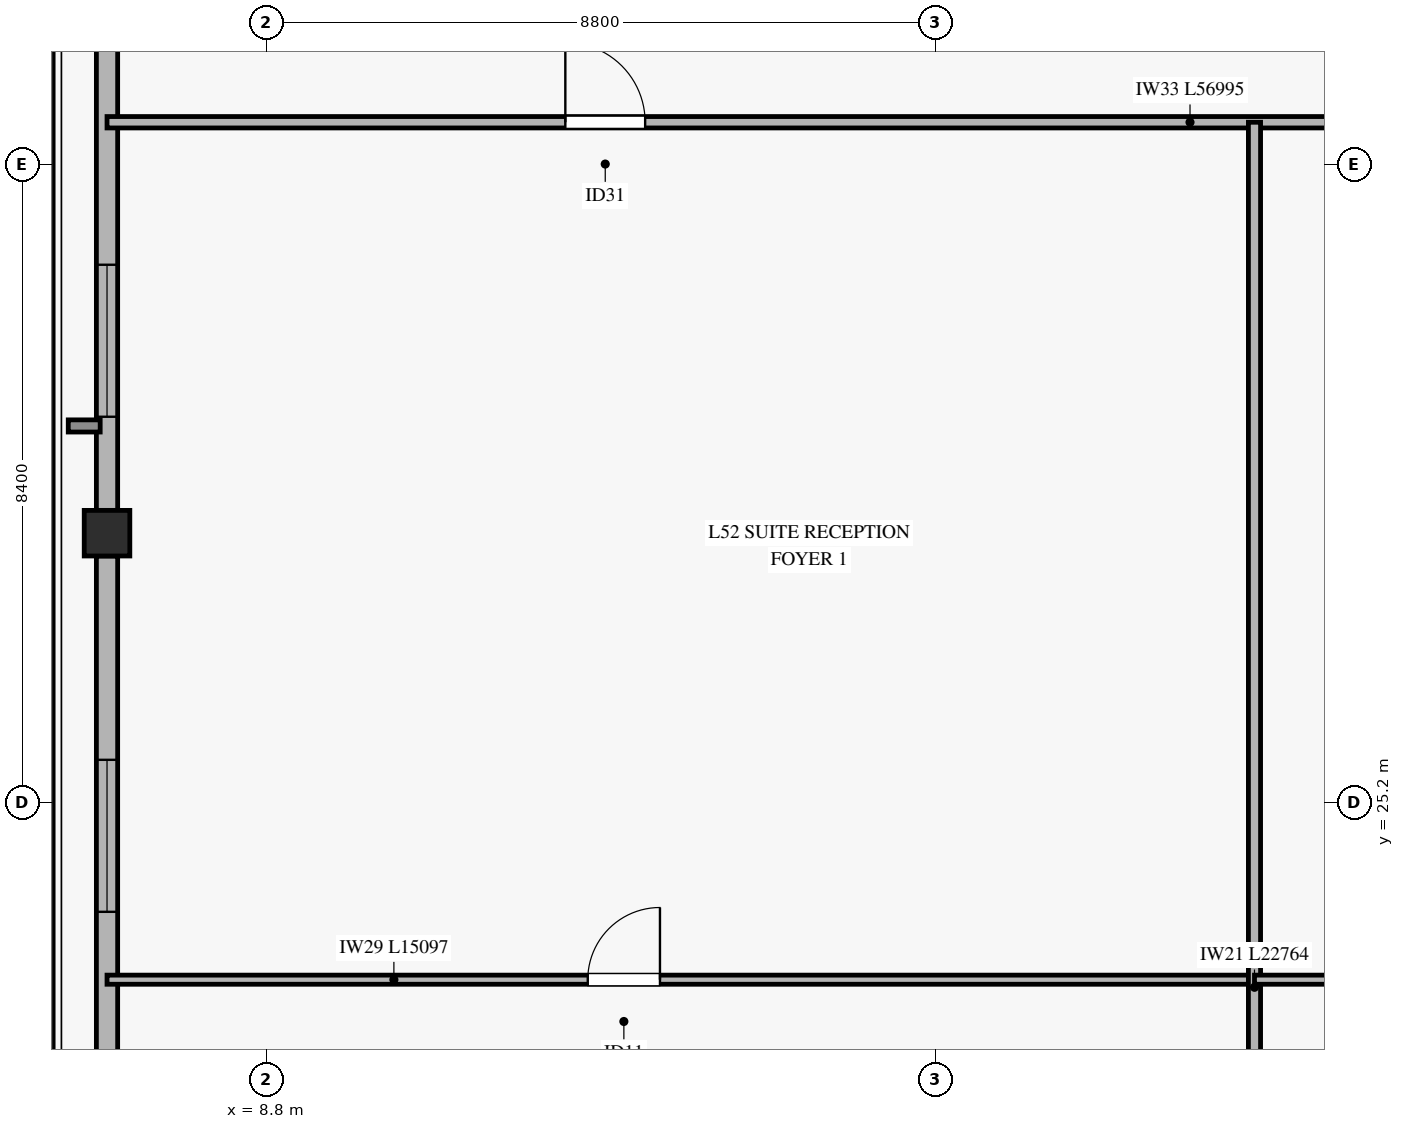
"""IFC4 building model, lengths in metres.
Left out: names, types, materials, properties, quantities, classifications, styles, units other than length and angle.
Written with IfcOpenShell. Run it as: python <this file> out.ifc"""

import sys

from ifc_helpers import new_model, si_unit, direction, frame, frame_2d, origin, origin_2d, place, context, subcontext, project, spatial, rectangle, hollow_rectangle, extrude, source, transform, mapped, element, fill, save


model = new_model("IFC4")
c1 = context("Model", 3, precision=1e-05, world=origin(), true_north=direction((0.0, 1.0)))
c2 = subcontext(c1, "Body", "Model", "MODEL_VIEW")
j1 = project(units=[si_unit("LENGTHUNIT", "METRE"), si_unit("PLANEANGLEUNIT", "RADIAN")], contexts=[c1])
p1 = place(None, origin())
s1 = spatial("IfcSite", under=j1, at=p1, CompositionType="ELEMENT")
p2 = place(p1, origin())
s2 = spatial("IfcBuilding", under=s1, at=p2, CompositionType="ELEMENT")
p3 = place(p2, frame((0.0, 0.0, 206.2)))
s3 = spatial("IfcBuildingStorey", under=s2, at=p3, CompositionType="ELEMENT", Elevation=206.2)
m1 = source(origin(), c2, "Body", "SweptSolid", [
    extrude(hollow_rectangle(XDim=0.6, YDim=0.6, WallThickness=0.028, at=origin_2d()), origin(), (0.0, 0.0, 1.0), 3.27),
])
p4 = place(p3, frame((6.703, 28.743, 0.0), z_axis=(0.0, 0.0, 1.0), x_axis=(1.0, 0.0, 0.0)))
e1 = element("IfcColumn", 1, at=p4, inside=s3, PredefinedType="COLUMN", context=c2, shape_type="MappedRepresentation", body=[
    mapped(m1, transform((0.0, 0.0, 0.0), x_axis=(1.0, 0.0, 0.0), y_axis=(0.0, 1.0, 0.0), z_axis=(0.0, 0.0, 1.0), scale=1.0)),
])
p5 = place(p3, frame((6.703, 14.186, 0.0), z_axis=(0.0, 0.0, 1.0), x_axis=(0.0, 1.0, 0.0)))
e2 = element("IfcWall", 2, at=p5, inside=s3, PredefinedType="SOLIDWALL", context=c2, shape_type="SweptSolid", body=[
    extrude(rectangle(XDim=14.257, YDim=0.28, at=frame_2d((7.128, 0.0))), origin(), (0.0, 0.0, 1.0), 2.75),
])
p6 = place(p5, frame((2.947, 0.0, 0.45)))
e3 = element("IfcOpeningElement", 3, at=p6, cuts=e2, PredefinedType="OPENING", context=c2, shape_type="SweptSolid", body=[
    extrude(rectangle(XDim=2.0, YDim=2.0, at=frame_2d((1.0, 1.0))), frame((0.0, 0.15, 0.0), z_axis=(0.0, -1.0, 0.0), x_axis=(1.0, 0.0, 0.0)), (0.0, 0.0, 1.0), 0.3),
])
p7 = place(p5, frame((9.575, 0.0, 0.45)))
e4 = element("IfcOpeningElement", 4, at=p7, cuts=e2, PredefinedType="OPENING", context=c2, shape_type="SweptSolid", body=[
    extrude(rectangle(XDim=2.0, YDim=2.0, at=frame_2d((1.0, 1.0))), frame((0.0, 0.15, 0.0), z_axis=(0.0, -1.0, 0.0), x_axis=(1.0, 0.0, 0.0)), (0.0, 0.0, 1.0), 0.3),
])
p8 = place(p3, frame((6.703, 29.043, 0.0), z_axis=(0.0, 0.0, 1.0), x_axis=(0.0, 1.0, 0.0)))
e5 = element("IfcWall", 5, at=p8, inside=s3, PredefinedType="SOLIDWALL", context=c2, shape_type="SweptSolid", body=[
    extrude(rectangle(XDim=14.257, YDim=0.28, at=frame_2d((7.128, 0.0))), origin(), (0.0, 0.0, 1.0), 2.75),
])
p9 = place(p8, frame((1.232, 0.0, 0.45)))
e6 = element("IfcOpeningElement", 6, at=p9, cuts=e5, PredefinedType="OPENING", context=c2, shape_type="SweptSolid", body=[
    extrude(rectangle(XDim=2.0, YDim=2.0, at=frame_2d((1.0, 1.0))), frame((0.0, 0.15, 0.0), z_axis=(0.0, -1.0, 0.0), x_axis=(1.0, 0.0, 0.0)), (0.0, 0.0, 1.0), 0.3),
])
p10 = place(p8, frame((11.108, 0.0, 0.45)))
e7 = element("IfcOpeningElement", 7, at=p10, cuts=e5, PredefinedType="OPENING", context=c2, shape_type="SweptSolid", body=[
    extrude(rectangle(XDim=2.0, YDim=2.0, at=frame_2d((1.0, 1.0))), frame((0.0, 0.15, 0.0), z_axis=(0.0, -1.0, 0.0), x_axis=(1.0, 0.0, 0.0)), (0.0, 0.0, 1.0), 0.3),
])
p11 = place(p3, frame((6.703, 34.15, 0.0), z_axis=(0.0, 0.0, 1.0), x_axis=(1.0, 0.0, 0.0)))
e8 = element("IfcWall", 8, at=p11, inside=s3, PredefinedType="PARTITIONING", context=c2, shape_type="SweptSolid", body=[
    extrude(rectangle(XDim=56.995, YDim=0.15, at=frame_2d((28.498, 0.0))), origin(), (0.0, 0.0, 1.0), 2.455),
])
p12 = place(p11, frame((6.03, 0.0, 0.0)))
e9 = element("IfcOpeningElement", 9, at=p12, cuts=e8, PredefinedType="OPENING", context=c2, shape_type="SweptSolid", body=[
    extrude(rectangle(XDim=1.05, YDim=2.15, at=frame_2d((0.525, 1.075))), frame((0.0, 0.085, 0.0), z_axis=(0.0, -1.0, 0.0), x_axis=(1.0, 0.0, 0.0)), (0.0, 0.0, 1.0), 0.17),
])
p13 = place(p11, frame((17.622, 0.0, 0.0)))
e10 = element("IfcOpeningElement", 10, at=p13, cuts=e8, PredefinedType="OPENING", context=c2, shape_type="SweptSolid", body=[
    extrude(rectangle(XDim=1.05, YDim=2.15, at=frame_2d((0.525, 1.075))), frame((0.0, 0.085, 0.0), z_axis=(0.0, -1.0, 0.0), x_axis=(1.0, 0.0, 0.0)), (0.0, 0.0, 1.0), 0.17),
])
p14 = place(p11, frame((23.442, 0.0, 0.0)))
e11 = element("IfcOpeningElement", 11, at=p14, cuts=e8, PredefinedType="OPENING", context=c2, shape_type="SweptSolid", body=[
    extrude(rectangle(XDim=1.05, YDim=2.15, at=frame_2d((0.525, 1.075))), frame((0.0, 0.085, 0.0), z_axis=(0.0, -1.0, 0.0), x_axis=(1.0, 0.0, 0.0)), (0.0, 0.0, 1.0), 0.17),
])
p15 = place(p11, frame((28.933, 0.0, 0.0)))
e12 = element("IfcOpeningElement", 12, at=p15, cuts=e8, PredefinedType="OPENING", context=c2, shape_type="SweptSolid", body=[
    extrude(rectangle(XDim=1.05, YDim=2.15, at=frame_2d((0.525, 1.075))), frame((0.0, 0.085, 0.0), z_axis=(0.0, -1.0, 0.0), x_axis=(1.0, 0.0, 0.0)), (0.0, 0.0, 1.0), 0.17),
])
p16 = place(p11, frame((34.133, 0.0, 0.0)))
e13 = element("IfcOpeningElement", 13, at=p16, cuts=e8, PredefinedType="OPENING", context=c2, shape_type="SweptSolid", body=[
    extrude(rectangle(XDim=1.05, YDim=2.15, at=frame_2d((0.525, 1.075))), frame((0.0, 0.085, 0.0), z_axis=(0.0, -1.0, 0.0), x_axis=(1.0, 0.0, 0.0)), (0.0, 0.0, 1.0), 0.17),
])
p17 = place(p11, frame((44.627, 0.0, 0.0)))
e14 = element("IfcOpeningElement", 14, at=p17, cuts=e8, PredefinedType="OPENING", context=c2, shape_type="SweptSolid", body=[
    extrude(rectangle(XDim=1.05, YDim=2.15, at=frame_2d((0.525, 1.075))), frame((0.0, 0.085, 0.0), z_axis=(0.0, -1.0, 0.0), x_axis=(1.0, 0.0, 0.0)), (0.0, 0.0, 1.0), 0.17),
])
p18 = place(p3, frame((6.703, 22.868, 0.0), z_axis=(0.0, 0.0, 1.0), x_axis=(1.0, 0.0, 0.0)))
e15 = element("IfcWall", 15, at=p18, inside=s3, PredefinedType="PARTITIONING", context=c2, shape_type="SweptSolid", body=[
    extrude(rectangle(XDim=15.097, YDim=0.12, at=frame_2d((7.549, 0.0))), origin(), (0.0, 0.0, 1.0), 2.455),
])
p19 = place(p18, frame((6.325, 0.0, 0.0)))
e16 = element("IfcOpeningElement", 16, at=p19, cuts=e15, PredefinedType="OPENING", context=c2, shape_type="SweptSolid", body=[
    extrude(rectangle(XDim=0.95, YDim=2.1, at=frame_2d((0.475, 1.05))), frame((0.0, 0.07, 0.0), z_axis=(0.0, -1.0, 0.0), x_axis=(1.0, 0.0, 0.0)), (0.0, 0.0, 1.0), 0.14),
])
p20 = place(p3, frame((21.8, 11.386, 0.0), z_axis=(0.0, 0.0, 1.0), x_axis=(0.0, 1.0, 0.0)))
e17 = element("IfcWall", 17, at=p20, inside=s3, PredefinedType="PARTITIONING", context=c2, shape_type="SweptSolid", body=[
    extrude(rectangle(XDim=22.764, YDim=0.16, at=frame_2d((11.382, 0.0))), origin(), (0.0, 0.0, 1.0), 2.755),
])
p21 = place(p3, frame((21.8, 22.868, 0.0), z_axis=(0.0, 0.0, 1.0), x_axis=(1.0, 0.0, 0.0)))
e18 = element("IfcWall", 18, at=p21, inside=s3, PredefinedType="PARTITIONING", context=c2, shape_type="SweptSolid", body=[
    extrude(rectangle(XDim=6.2, YDim=0.12, at=frame_2d((3.1, 0.0))), origin(), (0.0, 0.0, 1.0), 3.27),
])
p22 = place(p21, frame((2.646, 0.0, 0.0)))
e19 = element("IfcOpeningElement", 19, at=p22, cuts=e18, PredefinedType="OPENING", context=c2, shape_type="SweptSolid", body=[
    extrude(rectangle(XDim=0.95, YDim=2.1, at=frame_2d((0.475, 1.05))), frame((0.0, 0.07, 0.0), z_axis=(0.0, -1.0, 0.0), x_axis=(1.0, 0.0, 0.0)), (0.0, 0.0, 1.0), 0.14),
])
m2 = source(origin(), c2, "Body", "SweptSolid", [
    extrude(rectangle(XDim=2.0, YDim=2.0, at=frame_2d((1.0, 1.0))), frame((0.0, 0.03, 0.0), z_axis=(0.0, -1.0, 0.0), x_axis=(1.0, 0.0, 0.0)), (0.0, 0.0, 1.0), 0.06),
])
p23 = place(p7, origin())
e20 = element("IfcWindow", 20, at=p23, inside=s3, PartitioningType="SINGLE_PANEL", PredefinedType="WINDOW", context=c2, shape_type="MappedRepresentation", body=[
    mapped(m2, transform((0.0, 0.0, 0.0), x_axis=(1.0, 0.0, 0.0), y_axis=(0.0, 1.0, 0.0), z_axis=(0.0, 0.0, 1.0), scale=1.0)),
])
fill(e4, e20)
p24 = place(p9, origin())
e21 = element("IfcWindow", 21, at=p24, inside=s3, PartitioningType="SINGLE_PANEL", PredefinedType="WINDOW", context=c2, shape_type="MappedRepresentation", body=[
    mapped(m2, transform((0.0, 0.0, 0.0), x_axis=(1.0, 0.0, 0.0), y_axis=(0.0, 1.0, 0.0), z_axis=(0.0, 0.0, 1.0), scale=1.0)),
])
fill(e6, e21)
m3 = source(origin(), c2, "Body", "SweptSolid", [
    extrude(rectangle(XDim=1.05, YDim=2.15, at=frame_2d((0.525, 1.075))), frame((0.0, 0.025, 0.0), z_axis=(0.0, -1.0, 0.0), x_axis=(1.0, 0.0, 0.0)), (0.0, 0.0, 1.0), 0.05),
])
p25 = place(p12, origin())
e22 = element("IfcDoor", 22, at=p25, inside=s3, OperationType="SINGLE_SWING_LEFT", PredefinedType="DOOR", context=c2, shape_type="MappedRepresentation", body=[
    mapped(m3, transform((0.0, 0.0, 0.0), x_axis=(1.0, 0.0, 0.0), y_axis=(0.0, 1.0, 0.0), z_axis=(0.0, 0.0, 1.0), scale=1.0)),
])
fill(e9, e22)
m4 = source(origin(), c2, "Body", "SweptSolid", [
    extrude(rectangle(XDim=0.95, YDim=2.1, at=frame_2d((0.475, 1.05))), frame((0.0, 0.025, 0.0), z_axis=(0.0, -1.0, 0.0), x_axis=(1.0, 0.0, 0.0)), (0.0, 0.0, 1.0), 0.05),
])
p26 = place(p19, origin())
e23 = element("IfcDoor", 23, at=p26, inside=s3, OperationType="SINGLE_SWING_RIGHT", PredefinedType="DOOR", context=c2, shape_type="MappedRepresentation", body=[
    mapped(m4, transform((0.0, 0.0, 0.0), x_axis=(1.0, 0.0, 0.0), y_axis=(0.0, 1.0, 0.0), z_axis=(0.0, 0.0, 1.0), scale=1.0)),
])
fill(e16, e23)
save(model, sys.argv[1])
